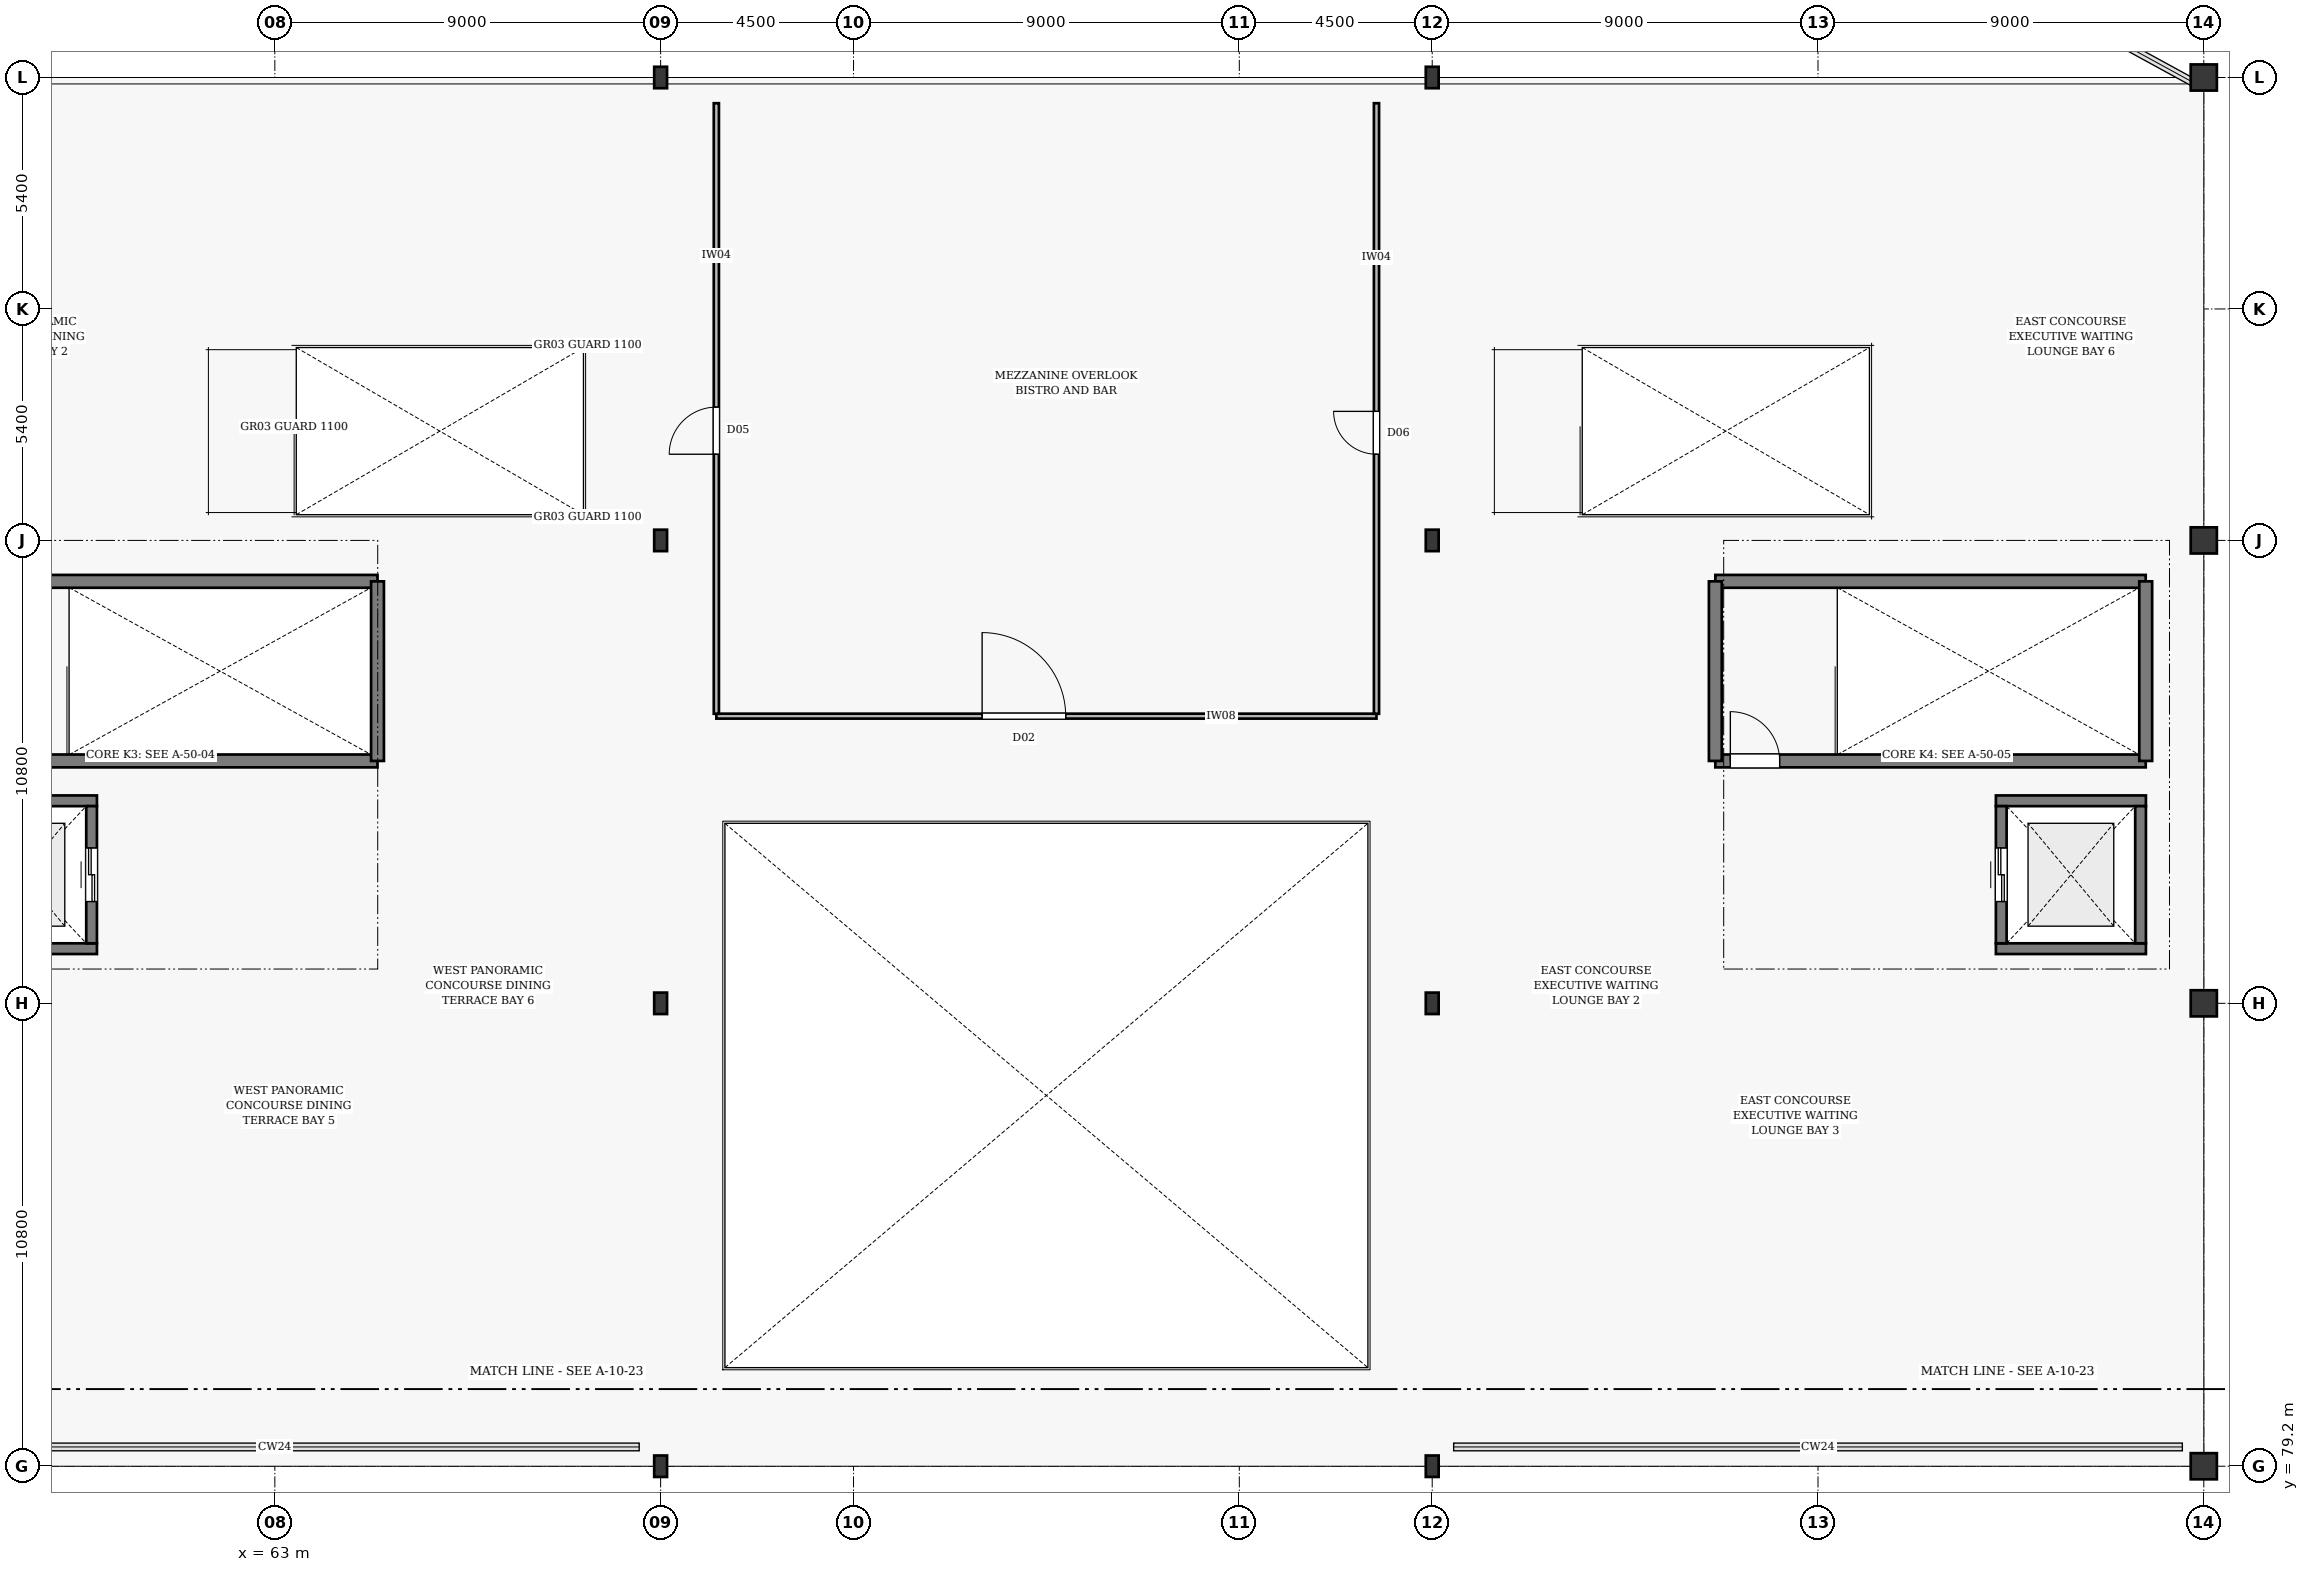
"""IFC4 building model, lengths in metres.
Left out: names, types, materials, properties, quantities, classifications, styles, units other than length and angle.
Written with IfcOpenShell. Run it as: python <this file> out.ifc"""

import sys

from ifc_helpers import new_model, si_unit, direction, frame, frame_2d, origin, origin_2d, place, context, subcontext, project, spatial, rectangle, hollow_circle, i_section, extrude, element, fill, save


model = new_model("IFC4")
c1 = context("Model", 3, precision=1e-05, world=origin(), true_north=direction((0.0, 1.0)))
c2 = subcontext(c1, "Body", "Model", "MODEL_VIEW")
j1 = project(units=[si_unit("LENGTHUNIT", "METRE"), si_unit("PLANEANGLEUNIT", "RADIAN")], contexts=[c1])
p1 = place(None, origin())
s1 = spatial("IfcSite", under=j1, at=p1, CompositionType="ELEMENT")
p2 = place(p1, origin())
s2 = spatial("IfcBuilding", under=s1, at=p2, CompositionType="ELEMENT")
p3 = place(p2, frame((0.0, 0.0, 12.6)))
s3 = spatial("IfcBuildingStorey", under=s2, at=p3, CompositionType="ELEMENT", Elevation=12.6)
for number, where, z_axis, x_axis in (
    (1, (72.0, 79.2, 0.0), (0.0, 0.0, 1.0), (1.0, 0.0, 0.0)),
    (2, (72.0, 90.0, 0.0), (0.0, 0.0, 1.0), (1.0, 0.0, 0.0)),
    (3, (72.0, 100.8, 0.0), (0.0, 0.0, 1.0), (1.0, 0.0, 0.0)),
    (4, (72.0, 111.6, 0.0), (0.0, 0.0, 1.0), (1.0, 0.0, 0.0)),
    (5, (90.0, 79.2, 0.0), (0.0, 0.0, 1.0), (1.0, 0.0, 0.0)),
    (6, (90.0, 90.0, 0.0), (0.0, 0.0, 1.0), (1.0, 0.0, 0.0)),
    (7, (90.0, 100.8, 0.0), (0.0, 0.0, 1.0), (1.0, 0.0, 0.0)),
    (8, (90.0, 111.6, 0.0), (0.0, 0.0, 1.0), (1.0, 0.0, 0.0)),
):
    element("IfcColumn", number, at=place(p3, frame(where, z_axis=z_axis, x_axis=x_axis)), inside=s3, PredefinedType="COLUMN", context=c2, shape_type="SweptSolid", body=[
        extrude(i_section(OverallWidth=0.3, OverallDepth=0.5, WebThickness=0.014, FlangeThickness=0.028, at=origin_2d()), origin(), (0.0, 0.0, 1.0), 3.2),
    ])
for number, where, z_axis, x_axis in (
    (9, (108.0, 79.2, 0.0), (0.0, 0.0, 1.0), (1.0, 0.0, 0.0)),
    (10, (108.0, 90.0, 0.0), (0.0, 0.0, 1.0), (1.0, 0.0, 0.0)),
    (11, (108.0, 100.8, 0.0), (0.0, 0.0, 1.0), (1.0, 0.0, 0.0)),
    (12, (108.0, 111.6, 0.0), (0.0, 0.0, 1.0), (1.0, 0.0, 0.0)),
):
    element("IfcColumn", number, at=place(p3, frame(where, z_axis=z_axis, x_axis=x_axis)), inside=s3, PredefinedType="COLUMN", context=c2, shape_type="SweptSolid", body=[
        extrude(hollow_circle(Radius=0.305, WallThickness=0.02, at=origin_2d()), origin(), (0.0, 0.0, 1.0), 3.2),
    ])
p4 = place(p3, frame((55.355, 95.655, 0.0), z_axis=(0.0, 0.0, 1.0), x_axis=(1.0, 0.0, 0.0)))
e13 = element("IfcWall", 13, at=p4, inside=s3, PredefinedType="SOLIDWALL", context=c2, shape_type="SweptSolid", body=[
    extrude(rectangle(XDim=10.04, YDim=0.3, at=frame_2d((5.02, 0.0))), origin(), (0.0, 0.0, 1.0), 4.5),
])
p5 = place(p4, frame((0.35, 0.0, 0.005)))
e14 = element("IfcOpeningElement", 14, at=p5, cuts=e13, PredefinedType="OPENING", context=c2, shape_type="SweptSolid", body=[
    extrude(rectangle(XDim=1.75, YDim=2.2, at=frame_2d((0.875, 1.1))), frame((0.0, 0.162, 0.0), z_axis=(0.0, -1.0, 0.0), x_axis=(1.0, 0.0, 0.0)), (0.0, 0.0, 1.0), 0.324),
])
p6 = place(p3, frame((55.355, 99.845, 0.0), z_axis=(0.0, 0.0, 1.0), x_axis=(1.0, 0.0, 0.0)))
e15 = element("IfcWall", 15, at=p6, inside=s3, PredefinedType="SOLIDWALL", context=c2, shape_type="SweptSolid", body=[
    extrude(rectangle(XDim=10.04, YDim=0.3, at=frame_2d((5.02, 0.0))), origin(), (0.0, 0.0, 1.0), 4.5),
])
p7 = place(p3, frame((65.395, 95.655, 0.0), z_axis=(0.0, 0.0, 1.0), x_axis=(0.0, 1.0, 0.0)))
e16 = element("IfcWall", 16, at=p7, inside=s3, PredefinedType="SOLIDWALL", context=c2, shape_type="SweptSolid", body=[
    extrude(rectangle(XDim=4.19, YDim=0.3, at=frame_2d((2.095, 0.0))), origin(), (0.0, 0.0, 1.0), 4.5),
])
p8 = place(p3, frame((96.605, 95.655, 0.0), z_axis=(0.0, 0.0, 1.0), x_axis=(1.0, 0.0, 0.0)))
e17 = element("IfcWall", 17, at=p8, inside=s3, PredefinedType="SOLIDWALL", context=c2, shape_type="SweptSolid", body=[
    extrude(rectangle(XDim=10.04, YDim=0.3, at=frame_2d((5.02, 0.0))), origin(), (0.0, 0.0, 1.0), 4.5),
])
p9 = place(p8, frame((0.35, 0.0, 0.005)))
e18 = element("IfcOpeningElement", 18, at=p9, cuts=e17, PredefinedType="OPENING", context=c2, shape_type="SweptSolid", body=[
    extrude(rectangle(XDim=1.15, YDim=2.15, at=frame_2d((0.575, 1.075))), frame((0.0, 0.162, 0.0), z_axis=(0.0, -1.0, 0.0), x_axis=(1.0, 0.0, 0.0)), (0.0, 0.0, 1.0), 0.324),
])
p10 = place(p3, frame((96.605, 99.845, 0.0), z_axis=(0.0, 0.0, 1.0), x_axis=(1.0, 0.0, 0.0)))
e19 = element("IfcWall", 19, at=p10, inside=s3, PredefinedType="SOLIDWALL", context=c2, shape_type="SweptSolid", body=[
    extrude(rectangle(XDim=10.04, YDim=0.3, at=frame_2d((5.02, 0.0))), origin(), (0.0, 0.0, 1.0), 4.5),
])
for number, where, z_axis, x_axis in (
    (20, (96.605, 95.655, 0.0), (0.0, 0.0, 1.0), (0.0, 1.0, 0.0)),
    (21, (106.645, 95.655, 0.0), (0.0, 0.0, 1.0), (0.0, 1.0, 0.0)),
):
    element("IfcWall", number, at=place(p3, frame(where, z_axis=z_axis, x_axis=x_axis)), inside=s3, PredefinedType="SOLIDWALL", context=c2, shape_type="SweptSolid", body=[
        extrude(rectangle(XDim=4.19, YDim=0.3, at=frame_2d((2.095, 0.0))), origin(), (0.0, 0.0, 1.0), 4.5),
    ])
for number, where, z_axis, x_axis in (
    (22, (55.35, 91.275, 0.0), (0.0, 0.0, 1.0), (1.0, 0.0, 0.0)),
    (23, (55.35, 94.725, 0.0), (0.0, 0.0, 1.0), (1.0, 0.0, 0.0)),
):
    element("IfcWall", number, at=place(p3, frame(where, z_axis=z_axis, x_axis=x_axis)), inside=s3, PredefinedType="SOLIDWALL", context=c2, shape_type="SweptSolid", body=[
        extrude(rectangle(XDim=3.5, YDim=0.25, at=frame_2d((1.75, 0.0))), origin(), (0.0, 0.0, 1.0), 3.05),
    ])
p11 = place(p3, frame((58.725, 91.4, 0.0), z_axis=(0.0, 0.0, 1.0), x_axis=(0.0, 1.0, 0.0)))
e24 = element("IfcWall", 24, at=p11, inside=s3, PredefinedType="SOLIDWALL", context=c2, shape_type="SweptSolid", body=[
    extrude(rectangle(XDim=3.2, YDim=0.25, at=frame_2d((1.6, 0.0))), origin(), (0.0, 0.0, 1.0), 3.05),
])
p12 = place(p11, frame((0.975, 0.0, 0.005)))
e25 = element("IfcOpeningElement", 25, at=p12, cuts=e24, PredefinedType="OPENING", context=c2, shape_type="SweptSolid", body=[
    extrude(rectangle(XDim=1.25, YDim=2.2, at=frame_2d((0.625, 1.1))), frame((0.0, 0.137, 0.0), z_axis=(0.0, -1.0, 0.0), x_axis=(1.0, 0.0, 0.0)), (0.0, 0.0, 1.0), 0.274),
])
for number, where, z_axis, x_axis in (
    (26, (103.15, 91.275, 0.0), (0.0, 0.0, 1.0), (1.0, 0.0, 0.0)),
    (27, (103.15, 94.725, 0.0), (0.0, 0.0, 1.0), (1.0, 0.0, 0.0)),
):
    element("IfcWall", number, at=place(p3, frame(where, z_axis=z_axis, x_axis=x_axis)), inside=s3, PredefinedType="SOLIDWALL", context=c2, shape_type="SweptSolid", body=[
        extrude(rectangle(XDim=3.5, YDim=0.25, at=frame_2d((1.75, 0.0))), origin(), (0.0, 0.0, 1.0), 3.05),
    ])
p13 = place(p3, frame((103.275, 91.4, 0.0), z_axis=(0.0, 0.0, 1.0), x_axis=(0.0, 1.0, 0.0)))
e28 = element("IfcWall", 28, at=p13, inside=s3, PredefinedType="SOLIDWALL", context=c2, shape_type="SweptSolid", body=[
    extrude(rectangle(XDim=3.2, YDim=0.25, at=frame_2d((1.6, 0.0))), origin(), (0.0, 0.0, 1.0), 3.05),
])
p14 = place(p13, frame((0.975, 0.0, 0.005)))
e29 = element("IfcOpeningElement", 29, at=p14, cuts=e28, PredefinedType="OPENING", context=c2, shape_type="SweptSolid", body=[
    extrude(rectangle(XDim=1.25, YDim=2.2, at=frame_2d((0.625, 1.1))), frame((0.0, 0.137, 0.0), z_axis=(0.0, -1.0, 0.0), x_axis=(1.0, 0.0, 0.0)), (0.0, 0.0, 1.0), 0.274),
])
p15 = place(p3, frame((106.525, 91.4, 0.0), z_axis=(0.0, 0.0, 1.0), x_axis=(0.0, 1.0, 0.0)))
e30 = element("IfcWall", 30, at=p15, inside=s3, PredefinedType="SOLIDWALL", context=c2, shape_type="SweptSolid", body=[
    extrude(rectangle(XDim=3.2, YDim=0.25, at=frame_2d((1.6, 0.0))), origin(), (0.0, 0.0, 1.0), 3.05),
])
p16 = place(p3, frame((73.3, 96.7, 0.0), z_axis=(0.0, 0.0, 1.0), x_axis=(1.0, 0.0, 0.0)))
e31 = element("IfcWall", 31, at=p16, inside=s3, PredefinedType="PARTITIONING", context=c2, shape_type="SweptSolid", body=[
    extrude(rectangle(XDim=15.4, YDim=0.115, at=frame_2d((7.7, 0.0))), origin(), (0.0, 0.0, 1.0), 4.35),
])
p17 = place(p16, frame((6.2, 0.0, 0.005)))
e32 = element("IfcOpeningElement", 32, at=p17, cuts=e31, PredefinedType="OPENING", context=c2, shape_type="SweptSolid", body=[
    extrude(rectangle(XDim=1.95, YDim=2.3, at=frame_2d((0.975, 1.15))), frame((0.0, 0.069, 0.0), z_axis=(0.0, -1.0, 0.0), x_axis=(1.0, 0.0, 0.0)), (0.0, 0.0, 1.0), 0.139),
])
p18 = place(p3, frame((73.3, 96.756, 0.0), z_axis=(0.0, 0.0, 1.0), x_axis=(0.0, 1.0, 0.0)))
e33 = element("IfcWall", 33, at=p18, inside=s3, PredefinedType="PARTITIONING", context=c2, shape_type="SweptSolid", body=[
    extrude(rectangle(XDim=14.244, YDim=0.12, at=frame_2d((7.122, 0.0))), origin(), (0.0, 0.0, 1.0), 4.35),
])
p19 = place(p18, frame((6.055, 0.0, 0.005)))
e34 = element("IfcOpeningElement", 34, at=p19, cuts=e33, PredefinedType="OPENING", context=c2, shape_type="SweptSolid", body=[
    extrude(rectangle(XDim=1.1, YDim=2.1, at=frame_2d((0.55, 1.05))), frame((0.0, 0.072, 0.0), z_axis=(0.0, -1.0, 0.0), x_axis=(1.0, 0.0, 0.0)), (0.0, 0.0, 1.0), 0.144),
])
p20 = place(p3, frame((88.7, 96.756, 0.0), z_axis=(0.0, 0.0, 1.0), x_axis=(0.0, 1.0, 0.0)))
e35 = element("IfcWall", 35, at=p20, inside=s3, PredefinedType="PARTITIONING", context=c2, shape_type="SweptSolid", body=[
    extrude(rectangle(XDim=14.244, YDim=0.12, at=frame_2d((7.122, 0.0))), origin(), (0.0, 0.0, 1.0), 4.35),
])
p21 = place(p20, frame((6.055, 0.0, 0.005)))
e36 = element("IfcOpeningElement", 36, at=p21, cuts=e35, PredefinedType="OPENING", context=c2, shape_type="SweptSolid", body=[
    extrude(rectangle(XDim=1.0, YDim=2.1, at=frame_2d((0.5, 1.05))), frame((0.0, 0.072, 0.0), z_axis=(0.0, -1.0, 0.0), x_axis=(1.0, 0.0, 0.0)), (0.0, 0.0, 1.0), 0.144),
])
p22 = place(p9, origin())
e37 = element("IfcDoor", 37, at=p22, inside=s3, OperationType="SINGLE_SWING_LEFT", PredefinedType="DOOR", context=c2, shape_type="SweptSolid", body=[
    extrude(rectangle(XDim=1.15, YDim=2.15, at=frame_2d((0.575, 1.075))), frame((0.0, 0.025, 0.0), z_axis=(0.0, -1.0, 0.0), x_axis=(1.0, 0.0, 0.0)), (0.0, 0.0, 1.0), 0.05),
])
fill(e18, e37)
p23 = place(p12, origin())
e38 = element("IfcDoor", 38, at=p23, inside=s3, OperationType="SLIDING_TO_LEFT", PredefinedType="DOOR", context=c2, shape_type="SweptSolid", body=[
    extrude(rectangle(XDim=1.25, YDim=2.2, at=frame_2d((0.625, 1.1))), frame((0.0, 0.025, 0.0), z_axis=(0.0, -1.0, 0.0), x_axis=(1.0, 0.0, 0.0)), (0.0, 0.0, 1.0), 0.05),
])
fill(e25, e38)
p24 = place(p14, origin())
e39 = element("IfcDoor", 39, at=p24, inside=s3, OperationType="SLIDING_TO_LEFT", PredefinedType="DOOR", context=c2, shape_type="SweptSolid", body=[
    extrude(rectangle(XDim=1.25, YDim=2.2, at=frame_2d((0.625, 1.1))), frame((0.0, 0.025, 0.0), z_axis=(0.0, -1.0, 0.0), x_axis=(1.0, 0.0, 0.0)), (0.0, 0.0, 1.0), 0.05),
])
fill(e29, e39)
p25 = place(p17, origin())
e40 = element("IfcDoor", 40, at=p25, inside=s3, OperationType="DOUBLE_DOOR_SINGLE_SWING", PredefinedType="DOOR", context=c2, shape_type="SweptSolid", body=[
    extrude(rectangle(XDim=1.95, YDim=2.3, at=frame_2d((0.975, 1.15))), frame((0.0, 0.025, 0.0), z_axis=(0.0, -1.0, 0.0), x_axis=(1.0, 0.0, 0.0)), (0.0, 0.0, 1.0), 0.05),
])
fill(e32, e40)
p26 = place(p19, origin())
e41 = element("IfcDoor", 41, at=p26, inside=s3, OperationType="SINGLE_SWING_LEFT", PredefinedType="DOOR", context=c2, shape_type="SweptSolid", body=[
    extrude(rectangle(XDim=1.1, YDim=2.1, at=frame_2d((0.55, 1.05))), frame((0.0, 0.025, 0.0), z_axis=(0.0, -1.0, 0.0), x_axis=(1.0, 0.0, 0.0)), (0.0, 0.0, 1.0), 0.05),
])
fill(e34, e41)
p27 = place(p21, origin())
e42 = element("IfcDoor", 42, at=p27, inside=s3, OperationType="SINGLE_SWING_RIGHT", PredefinedType="DOOR", context=c2, shape_type="SweptSolid", body=[
    extrude(rectangle(XDim=1.0, YDim=2.1, at=frame_2d((0.5, 1.05))), frame((0.0, 0.025, 0.0), z_axis=(0.0, -1.0, 0.0), x_axis=(1.0, 0.0, 0.0)), (0.0, 0.0, 1.0), 0.05),
])
fill(e36, e42)
save(model, sys.argv[1])
